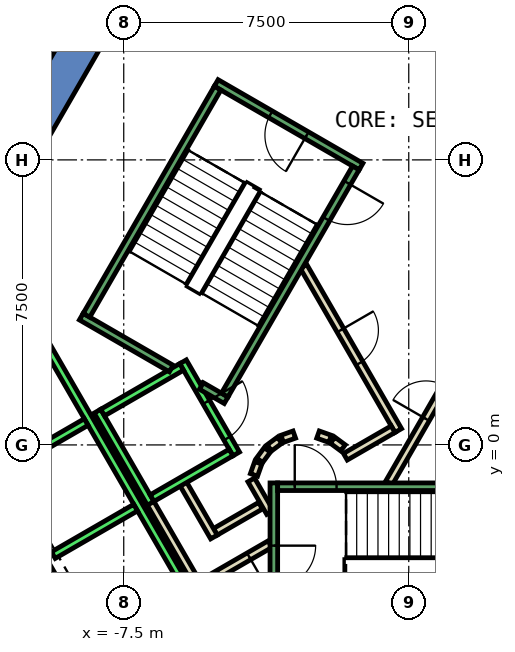
"""IFC4 building model, lengths in metres.
Left out: names, types, materials, properties, quantities, classifications, styles, units other than length and angle.
Written with IfcOpenShell. Run it as: python <this file> out.ifc"""

import sys

from ifc_helpers import new_model, si_unit, direction, frame, frame_2d, origin, place, context, subcontext, project, spatial, polyline, rectangle, outline, extrude, element, fill, save


model = new_model("IFC4")
c1 = context("Model", 3, precision=1e-05, world=origin(), true_north=direction((0.0, 1.0)))
c2 = subcontext(c1, "Body", "Model", "MODEL_VIEW")
j1 = project(units=[si_unit("LENGTHUNIT", "METRE"), si_unit("PLANEANGLEUNIT", "RADIAN")], contexts=[c1])
p1 = place(None, origin())
s1 = spatial("IfcSite", under=j1, at=p1, CompositionType="ELEMENT")
p2 = place(p1, origin())
s2 = spatial("IfcBuilding", under=s1, at=p2, CompositionType="ELEMENT")
p3 = place(p2, frame((0.0, 0.0, 56.0)))
s3 = spatial("IfcBuildingStorey", under=s2, at=p3, CompositionType="ELEMENT", Elevation=56.0)
p4 = place(p3, frame((0.0, 0.0, -0.4)))
e1 = element("IfcWall", 1, at=p4, inside=s3, PredefinedType="SHEAR", context=c2, shape_type="SweptSolid", body=[
    extrude(outline(polyline([(-12.267, 5.252), (-11.402, 4.752), (-6.351, 13.5), (-6.928, 14.5), (-12.267, 5.252)])), origin(), (0.0, 0.0, 1.0), 4.2),
])
p5 = place(p3, frame((0.0, 0.0, -0.4)))
e2 = element("IfcWall", 2, at=p5, inside=s3, PredefinedType="SHEAR", context=c2, shape_type="SweptSolid", body=[
    extrude(outline(polyline([(-13.856, 2.5), (-6.928, -9.5), (-6.351, -8.5), (-12.702, 2.5), (-13.856, 2.5)])), origin(), (0.0, 0.0, 1.0), 4.2),
])
p6 = place(p3, frame((-3.9, -1.599, 0.0), z_axis=(0.0, 0.0, 1.0), x_axis=(-0.865969445389, -0.500096910261, 0.0)))
e3 = element("IfcWall", 3, at=p6, inside=s3, PredefinedType="PARTITIONING", context=c2, shape_type="SweptSolid", body=[
    extrude(rectangle(XDim=1.373, YDim=0.2, at=frame_2d((0.687, 0.0))), origin(), (0.0, 0.0, 1.0), 3.8),
])
p7 = place(p3, frame((-5.126, -2.422, 0.0), z_axis=(0.0, 0.0, 1.0), x_axis=(-0.500062241894, 0.865989465428, 0.0)))
e4 = element("IfcWall", 4, at=p7, inside=s3, PredefinedType="PARTITIONING", context=c2, shape_type="SweptSolid", body=[
    extrude(rectangle(XDim=1.7, YDim=0.2, at=frame_2d((0.85, 0.0))), origin(), (0.0, 0.0, 1.0), 3.8),
])
p8 = place(p3, frame((-3.65, -2.61, 0.0), z_axis=(0.0, 0.0, 1.0), x_axis=(-0.866072462134, -0.499918483688, 0.0)))
e5 = element("IfcWall", 5, at=p8, inside=s3, PredefinedType="PARTITIONING", context=c2, shape_type="SweptSolid", body=[
    extrude(rectangle(XDim=2.084, YDim=0.2, at=frame_2d((1.042, 0.0))), origin(), (0.0, 0.0, 1.0), 3.8),
])
p9 = place(p8, frame((0.642, 0.0, 0.0)))
e6 = element("IfcOpeningElement", 6, at=p9, cuts=e5, PredefinedType="OPENING", context=c2, shape_type="SweptSolid", body=[
    extrude(rectangle(XDim=0.9, YDim=2.1, at=frame_2d((0.45, 1.05))), frame((0.0, 0.11, 0.0), z_axis=(0.0, -1.0, 0.0), x_axis=(1.0, 0.0, 0.0)), (0.0, 0.0, 1.0), 0.22),
])
p10 = place(p3, frame((-5.492, -3.788, 0.0), z_axis=(0.0, 0.0, 1.0), x_axis=(-0.500008949224, 0.866020236886, 0.0)))
e7 = element("IfcWall", 7, at=p10, inside=s3, PredefinedType="PARTITIONING", context=c2, shape_type="SweptSolid", body=[
    extrude(rectangle(XDim=2.68, YDim=0.2, at=frame_2d((1.34, 0.0))), origin(), (0.0, 0.0, 1.0), 3.8),
])
p11 = place(p3, frame((-4.145, -0.92, 0.0), z_axis=(0.0, 0.0, 1.0), x_axis=(0.499743786207, -0.866173278362, 0.0)))
e8 = element("IfcWall", 8, at=p11, inside=s3, PredefinedType="PARTITIONING", context=c2, shape_type="SweptSolid", body=[
    extrude(rectangle(XDim=0.991, YDim=0.2, at=frame_2d((0.495, 0.0))), origin(), (0.0, 0.0, 1.0), 3.8),
])
p12 = place(p3, frame((-0.52, -1.0, 0.0), z_axis=(0.0, 0.0, 1.0), x_axis=(0.50011622646, 0.865958290007, 0.0)))
e9 = element("IfcWall", 9, at=p12, inside=s3, PredefinedType="PARTITIONING", context=c2, shape_type="SweptSolid", body=[
    extrude(rectangle(XDim=4.991, YDim=0.2, at=frame_2d((2.496, 0.0))), origin(), (0.0, 0.0, 1.0), 3.8),
])
p13 = place(p12, frame((1.945, 0.0, 0.0)))
e10 = element("IfcOpeningElement", 10, at=p13, cuts=e9, PredefinedType="OPENING", context=c2, shape_type="SweptSolid", body=[
    extrude(rectangle(XDim=1.0, YDim=2.1, at=frame_2d((0.5, 1.05))), frame((0.0, 0.11, 0.0), z_axis=(0.0, -1.0, 0.0), x_axis=(1.0, 0.0, 0.0)), (0.0, 0.0, 1.0), 0.22),
])
p14 = place(p3, frame((-2.771, 4.7, 0.0), z_axis=(0.0, 0.0, 1.0), x_axis=(0.499969479948, -0.866043023828, 0.0)))
e11 = element("IfcWall", 11, at=p14, inside=s3, PredefinedType="PARTITIONING", context=c2, shape_type="SweptSolid", body=[
    extrude(rectangle(XDim=4.99, YDim=0.2, at=frame_2d((2.495, 0.0))), origin(), (0.0, 0.0, 1.0), 3.8),
])
p15 = place(p14, frame((1.945, 0.0, 0.0)))
e12 = element("IfcOpeningElement", 12, at=p15, cuts=e11, PredefinedType="OPENING", context=c2, shape_type="SweptSolid", body=[
    extrude(rectangle(XDim=1.0, YDim=2.1, at=frame_2d((0.5, 1.05))), frame((0.0, 0.11, 0.0), z_axis=(0.0, -1.0, 0.0), x_axis=(1.0, 0.0, 0.0)), (0.0, 0.0, 1.0), 0.22),
])
p16 = place(p3, frame((-0.412, 0.414, 0.0), z_axis=(0.0, 0.0, 1.0), x_axis=(-0.866017369001, -0.500013916395, 0.0)))
e13 = element("IfcWall", 13, at=p16, inside=s3, PredefinedType="PARTITIONING", context=c2, shape_type="SweptSolid", body=[
    extrude(rectangle(XDim=1.45, YDim=0.2, at=frame_2d((0.725, 0.0))), origin(), (0.0, 0.0, 1.0), 3.8),
])
p17 = place(p3, frame((-1.731, -0.077, 0.0), z_axis=(0.0, 0.0, 1.0), x_axis=(-0.804311165252, 0.594208338422, 0.0)))
e14 = element("IfcWall", 14, at=p17, inside=s3, PredefinedType="PARTITIONING", context=c2, shape_type="SweptSolid", body=[
    extrude(rectangle(XDim=0.338, YDim=0.2, at=frame_2d((0.169, 0.0))), origin(), (0.0, 0.0, 1.0), 3.8),
])
p18 = place(p3, frame((-2.07, 0.16, 0.0), z_axis=(0.0, 0.0, 1.0), x_axis=(-0.942199461132, 0.335052496547, 0.0)))
e15 = element("IfcWall", 15, at=p18, inside=s3, PredefinedType="PARTITIONING", context=c2, shape_type="SweptSolid", body=[
    extrude(rectangle(XDim=0.337, YDim=0.2, at=frame_2d((0.169, 0.0))), origin(), (0.0, 0.0, 1.0), 3.8),
])
p19 = place(p3, frame((-3.012, 0.273, 0.0), z_axis=(0.0, 0.0, 1.0), x_axis=(-0.942280615813, -0.334824194261, 0.0)))
e16 = element("IfcWall", 16, at=p19, inside=s3, PredefinedType="PARTITIONING", context=c2, shape_type="SweptSolid", body=[
    extrude(rectangle(XDim=0.338, YDim=0.2, at=frame_2d((0.169, 0.0))), origin(), (0.0, 0.0, 1.0), 3.8),
])
p20 = place(p3, frame((-3.397, 0.124, 0.0), z_axis=(0.0, 0.0, 1.0), x_axis=(-0.804311165252, -0.594208338422, 0.0)))
e17 = element("IfcWall", 17, at=p20, inside=s3, PredefinedType="PARTITIONING", context=c2, shape_type="SweptSolid", body=[
    extrude(rectangle(XDim=0.338, YDim=0.2, at=frame_2d((0.169, 0.0))), origin(), (0.0, 0.0, 1.0), 3.8),
])
p21 = place(p3, frame((-3.723, -0.131, 0.0), z_axis=(0.0, 0.0, 1.0), x_axis=(-0.594675113454, -0.803966112121, 0.0)))
e18 = element("IfcWall", 18, at=p21, inside=s3, PredefinedType="PARTITIONING", context=c2, shape_type="SweptSolid", body=[
    extrude(rectangle(XDim=0.338, YDim=0.2, at=frame_2d((0.169, 0.0))), origin(), (0.0, 0.0, 1.0), 3.8),
])
p22 = place(p3, frame((-3.96, -0.47, 0.0), z_axis=(0.0, 0.0, 1.0), x_axis=(-0.334824194261, -0.942280615813, 0.0)))
e19 = element("IfcWall", 19, at=p22, inside=s3, PredefinedType="PARTITIONING", context=c2, shape_type="SweptSolid", body=[
    extrude(rectangle(XDim=0.338, YDim=0.2, at=frame_2d((0.169, 0.0))), origin(), (0.0, 0.0, 1.0), 3.8),
])
p23 = place(p3, frame((-5.94, 2.188, 0.0), z_axis=(0.0, 0.0, 1.0), x_axis=(0.49994636267, -0.866056369097, 0.0)))
e20 = element("IfcWall", 20, at=p23, inside=s3, PredefinedType="STANDARD", context=c2, shape_type="SweptSolid", body=[
    extrude(rectangle(XDim=2.8, YDim=0.2, at=frame_2d((1.4, 0.0))), origin(), (0.0, 0.0, 1.0), 3.8),
])
p24 = place(p23, frame((1.225, 0.0, 0.0)))
e21 = element("IfcOpeningElement", 21, at=p24, cuts=e20, PredefinedType="OPENING", context=c2, shape_type="SweptSolid", body=[
    extrude(rectangle(XDim=1.1, YDim=2.1, at=frame_2d((0.55, 1.05))), frame((0.0, 0.11, 0.0), z_axis=(0.0, -1.0, 0.0), x_axis=(1.0, 0.0, 0.0)), (0.0, 0.0, 1.0), 0.22),
])
p25 = place(p3, frame((-8.192, 0.888, 0.0), z_axis=(0.0, 0.0, 1.0), x_axis=(0.49994636267, -0.866056369097, 0.0)))
e22 = element("IfcWall", 22, at=p25, inside=s3, PredefinedType="STANDARD", context=c2, shape_type="SweptSolid", body=[
    extrude(rectangle(XDim=2.8, YDim=0.2, at=frame_2d((1.4, 0.0))), origin(), (0.0, 0.0, 1.0), 3.8),
])
for number, where, z_axis, x_axis in (
    (23, (-5.977, 2.052, 0.0), (0.0, 0.0, 1.0), (-0.866, -0.5, 0.0)),
    (24, (-4.677, -0.2, 0.0), (0.0, 0.0, 1.0), (-0.866, -0.5, 0.0)),
):
    element("IfcWall", number, at=place(p3, frame(where, z_axis=z_axis, x_axis=x_axis)), inside=s3, PredefinedType="STANDARD", context=c2, shape_type="SweptSolid", body=[
        extrude(rectangle(XDim=2.399, YDim=0.2, at=frame_2d((1.2, 0.0))), origin(), (0.0, 0.0, 1.0), 3.8),
    ])
p26 = place(p3, frame((-9.751, 2.99, 0.0), z_axis=(0.0, 0.0, 1.0), x_axis=(0.50000090737, -0.866024879913, 0.0)))
e25 = element("IfcWall", 25, at=p26, inside=s3, PredefinedType="STANDARD", context=c2, shape_type="SweptSolid", body=[
    extrude(rectangle(XDim=10.6, YDim=0.2, at=frame_2d((5.3, 0.0))), origin(), (0.0, 0.0, 1.0), 3.8),
])
for number, where, z_axis, x_axis in (
    (26, (-8.488, 0.602, 0.0), (0.0, 0.0, 1.0), (-0.866, -0.5, 0.0)),
    (27, (-7.188, -1.65, 0.0), (0.0, 0.0, 1.0), (-0.866, -0.5, 0.0)),
):
    element("IfcWall", number, at=place(p3, frame(where, z_axis=z_axis, x_axis=x_axis)), inside=s3, PredefinedType="STANDARD", context=c2, shape_type="SweptSolid", body=[
        extrude(rectangle(XDim=2.5, YDim=0.2, at=frame_2d((1.25, 0.0))), origin(), (0.0, 0.0, 1.0), 3.8),
    ])
p27 = place(p3, frame((-3.55, -1.0, 0.0), z_axis=(0.0, 0.0, 1.0), x_axis=(0.0, -1.0, 0.0)))
e28 = element("IfcWall", 28, at=p27, inside=s3, PredefinedType="STANDARD", context=c2, shape_type="SweptSolid", body=[
    extrude(rectangle(XDim=4.4, YDim=0.2, at=frame_2d((2.2, 0.0))), origin(), (0.0, 0.0, 1.0), 3.8),
])
p28 = place(p27, frame((1.65, 0.0, 0.0)))
e29 = element("IfcOpeningElement", 29, at=p28, cuts=e28, PredefinedType="OPENING", context=c2, shape_type="SweptSolid", body=[
    extrude(rectangle(XDim=1.1, YDim=2.2, at=frame_2d((0.55, 1.1))), frame((0.0, 0.11, 0.0), z_axis=(0.0, -1.0, 0.0), x_axis=(1.0, 0.0, 0.0)), (0.0, 0.0, 1.0), 0.22),
])
p29 = place(p3, frame((-3.45, -1.1, 0.0), z_axis=(0.0, 0.0, 1.0), x_axis=(1.0, 0.0, 0.0)))
e30 = element("IfcWall", 30, at=p29, inside=s3, PredefinedType="STANDARD", context=c2, shape_type="SweptSolid", body=[
    extrude(rectangle(XDim=6.9, YDim=0.2, at=frame_2d((3.45, 0.0))), origin(), (0.0, 0.0, 1.0), 3.8),
])
p30 = place(p29, frame((0.45, 0.0, 0.0)))
e31 = element("IfcOpeningElement", 31, at=p30, cuts=e30, PredefinedType="OPENING", context=c2, shape_type="SweptSolid", body=[
    extrude(rectangle(XDim=1.1, YDim=2.2, at=frame_2d((0.55, 1.1))), frame((0.0, 0.11, 0.0), z_axis=(0.0, -1.0, 0.0), x_axis=(1.0, 0.0, 0.0)), (0.0, 0.0, 1.0), 0.22),
])
p31 = place(p3, frame((-1.256, 7.324, 0.0), z_axis=(0.0, 0.0, 1.0), x_axis=(-0.866046073146, 0.499964197906, 0.0)))
e32 = element("IfcWall", 32, at=p31, inside=s3, PredefinedType="STANDARD", context=c2, shape_type="SweptSolid", body=[
    extrude(rectangle(XDim=4.4, YDim=0.2, at=frame_2d((2.2, 0.0))), origin(), (0.0, 0.0, 1.0), 3.8),
])
p32 = place(p31, frame((1.65, 0.0, 0.0)))
e33 = element("IfcOpeningElement", 33, at=p32, cuts=e32, PredefinedType="OPENING", context=c2, shape_type="SweptSolid", body=[
    extrude(rectangle(XDim=1.1, YDim=2.2, at=frame_2d((0.55, 1.1))), frame((0.0, 0.11, 0.0), z_axis=(0.0, -1.0, 0.0), x_axis=(1.0, 0.0, 0.0)), (0.0, 0.0, 1.0), 0.22),
])
p33 = place(p3, frame((-6.25, 2.01, 0.0), z_axis=(0.0, 0.0, 1.0), x_axis=(-0.86611865017, 0.499838457731, 0.0)))
e34 = element("IfcWall", 34, at=p33, inside=s3, PredefinedType="STANDARD", context=c2, shape_type="SweptSolid", body=[
    extrude(rectangle(XDim=2.733, YDim=0.2, at=frame_2d((1.366, 0.0))), origin(), (0.0, 0.0, 1.0), 3.8),
])
p34 = place(p3, frame((-4.806, 1.176, 0.0), z_axis=(0.0, 0.0, 1.0), x_axis=(-0.866558586415, 0.499075361355, 0.0)))
e35 = element("IfcWall", 35, at=p34, inside=s3, PredefinedType="STANDARD", context=c2, shape_type="SweptSolid", body=[
    extrude(rectangle(XDim=0.751, YDim=0.2, at=frame_2d((0.376, 0.0))), origin(), (0.0, 0.0, 1.0), 3.8),
])
p35 = place(p3, frame((-1.393, 7.288, 0.0), z_axis=(0.0, 0.0, 1.0), x_axis=(-0.499963383562, -0.866046543262, 0.0)))
e36 = element("IfcWall", 36, at=p35, inside=s3, PredefinedType="STANDARD", context=c2, shape_type="SweptSolid", body=[
    extrude(rectangle(XDim=6.9, YDim=0.2, at=frame_2d((3.45, 0.0))), origin(), (0.0, 0.0, 1.0), 3.8),
])
p36 = place(p35, frame((0.45, 0.0, 0.0)))
e37 = element("IfcOpeningElement", 37, at=p36, cuts=e36, PredefinedType="OPENING", context=c2, shape_type="SweptSolid", body=[
    extrude(rectangle(XDim=1.1, YDim=2.2, at=frame_2d((0.55, 1.1))), frame((0.0, 0.11, 0.0), z_axis=(0.0, -1.0, 0.0), x_axis=(1.0, 0.0, 0.0)), (0.0, 0.0, 1.0), 0.22),
])
p37 = place(p3, frame((-5.03, 9.388, 0.0), z_axis=(0.0, 0.0, 1.0), x_axis=(-0.499978703459, -0.866037698999, 0.0)))
e38 = element("IfcWall", 38, at=p37, inside=s3, PredefinedType="STANDARD", context=c2, shape_type="SweptSolid", body=[
    extrude(rectangle(XDim=6.9, YDim=0.2, at=frame_2d((3.45, 0.0))), origin(), (0.0, 0.0, 1.0), 3.8),
])
p38 = place(p13, origin())
e39 = element("IfcDoor", 39, at=p38, inside=s3, OperationType="SINGLE_SWING_LEFT", PredefinedType="DOOR", context=c2, shape_type="SweptSolid", body=[
    extrude(rectangle(XDim=1.0, YDim=2.1, at=frame_2d((0.5, 1.05))), frame((0.0, 0.025, 0.0), z_axis=(0.0, -1.0, 0.0), x_axis=(1.0, 0.0, 0.0)), (0.0, 0.0, 1.0), 0.05),
])
fill(e10, e39)
p39 = place(p15, origin())
e40 = element("IfcDoor", 40, at=p39, inside=s3, OperationType="SINGLE_SWING_RIGHT", PredefinedType="DOOR", context=c2, shape_type="SweptSolid", body=[
    extrude(rectangle(XDim=1.0, YDim=2.1, at=frame_2d((0.5, 1.05))), frame((0.0, 0.025, 0.0), z_axis=(0.0, -1.0, 0.0), x_axis=(1.0, 0.0, 0.0)), (0.0, 0.0, 1.0), 0.05),
])
fill(e12, e40)
p40 = place(p9, origin())
e41 = element("IfcDoor", 41, at=p40, inside=s3, OperationType="SINGLE_SWING_LEFT", PredefinedType="DOOR", context=c2, shape_type="SweptSolid", body=[
    extrude(rectangle(XDim=0.9, YDim=2.1, at=frame_2d((0.45, 1.05))), frame((0.0, 0.025, 0.0), z_axis=(0.0, -1.0, 0.0), x_axis=(1.0, 0.0, 0.0)), (0.0, 0.0, 1.0), 0.05),
])
fill(e6, e41)
p41 = place(p24, origin())
e42 = element("IfcDoor", 42, at=p41, inside=s3, OperationType="SLIDING_TO_LEFT", PredefinedType="DOOR", context=c2, shape_type="SweptSolid", body=[
    extrude(rectangle(XDim=1.1, YDim=2.1, at=frame_2d((0.55, 1.05))), frame((0.0, 0.025, 0.0), z_axis=(0.0, -1.0, 0.0), x_axis=(1.0, 0.0, 0.0)), (0.0, 0.0, 1.0), 0.05),
])
fill(e21, e42)
p42 = place(p30, origin())
e43 = element("IfcDoor", 43, at=p42, inside=s3, OperationType="SINGLE_SWING_LEFT", PredefinedType="DOOR", context=c2, shape_type="SweptSolid", body=[
    extrude(rectangle(XDim=1.1, YDim=2.2, at=frame_2d((0.55, 1.1))), frame((0.0, 0.025, 0.0), z_axis=(0.0, -1.0, 0.0), x_axis=(1.0, 0.0, 0.0)), (0.0, 0.0, 1.0), 0.05),
])
fill(e31, e43)
p43 = place(p28, origin())
e44 = element("IfcDoor", 44, at=p43, inside=s3, OperationType="SINGLE_SWING_LEFT", PredefinedType="DOOR", context=c2, shape_type="SweptSolid", body=[
    extrude(rectangle(XDim=1.1, YDim=2.2, at=frame_2d((0.55, 1.1))), frame((0.0, 0.025, 0.0), z_axis=(0.0, -1.0, 0.0), x_axis=(1.0, 0.0, 0.0)), (0.0, 0.0, 1.0), 0.05),
])
fill(e29, e44)
p44 = place(p36, origin())
e45 = element("IfcDoor", 45, at=p44, inside=s3, OperationType="SINGLE_SWING_LEFT", PredefinedType="DOOR", context=c2, shape_type="SweptSolid", body=[
    extrude(rectangle(XDim=1.1, YDim=2.2, at=frame_2d((0.55, 1.1))), frame((0.0, 0.025, 0.0), z_axis=(0.0, -1.0, 0.0), x_axis=(1.0, 0.0, 0.0)), (0.0, 0.0, 1.0), 0.05),
])
fill(e37, e45)
p45 = place(p32, origin())
e46 = element("IfcDoor", 46, at=p45, inside=s3, OperationType="SINGLE_SWING_LEFT", PredefinedType="DOOR", context=c2, shape_type="SweptSolid", body=[
    extrude(rectangle(XDim=1.1, YDim=2.2, at=frame_2d((0.55, 1.1))), frame((0.0, 0.025, 0.0), z_axis=(0.0, -1.0, 0.0), x_axis=(1.0, 0.0, 0.0)), (0.0, 0.0, 1.0), 0.05),
])
fill(e33, e46)
save(model, sys.argv[1])
